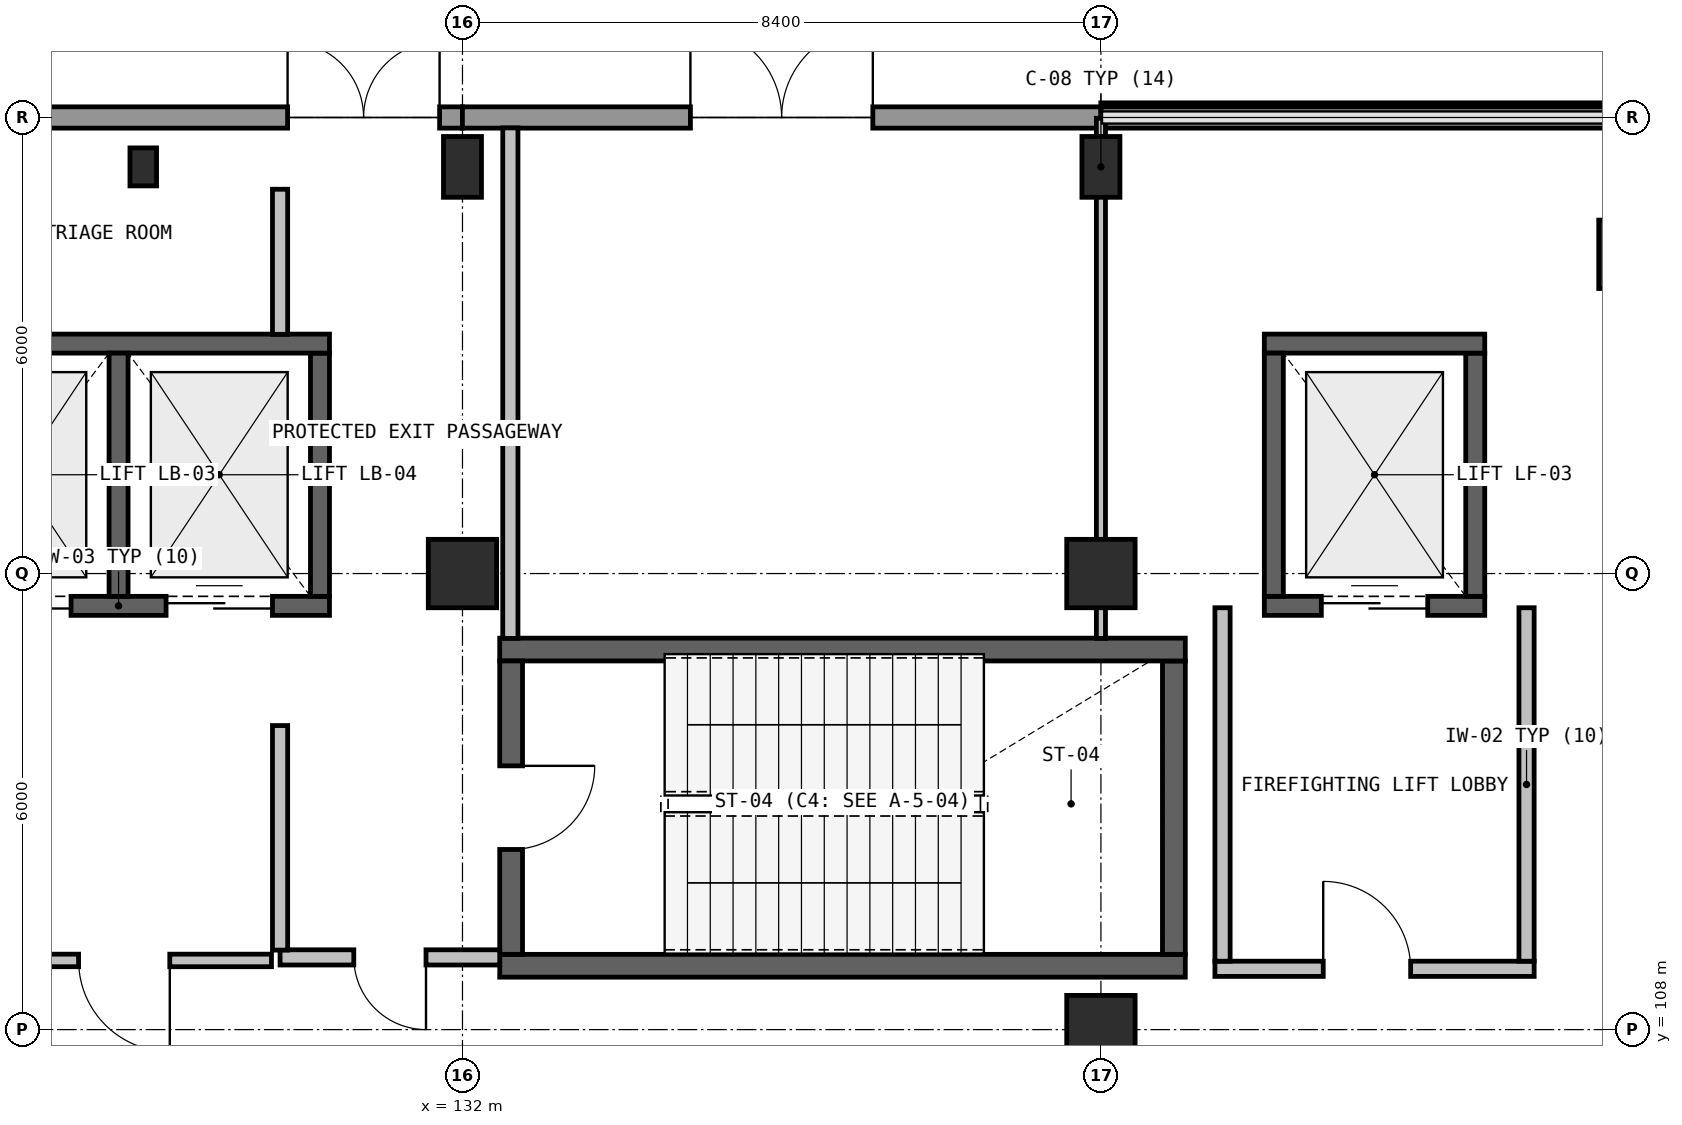
"""IFC4 building model, lengths in metres.
Left out: names, types, materials, properties, quantities, classifications, styles, units other than length and angle.
Written with IfcOpenShell. Run it as: python <this file> out.ifc"""

import sys

from ifc_helpers import new_model, si_unit, direction, frame, frame_2d, origin, origin_2d, place, context, subcontext, project, spatial, rectangle, extrude, element, fill, save


model = new_model("IFC4")
c1 = context("Model", 3, precision=1e-05, world=origin(), true_north=direction((0.0, 1.0)))
c2 = subcontext(c1, "Body", "Model", "MODEL_VIEW")
j1 = project(units=[si_unit("LENGTHUNIT", "METRE"), si_unit("PLANEANGLEUNIT", "RADIAN")], contexts=[c1])
p1 = place(None, origin())
s1 = spatial("IfcSite", under=j1, at=p1, CompositionType="ELEMENT")
p2 = place(p1, origin())
s2 = spatial("IfcBuilding", under=s1, at=p2, CompositionType="ELEMENT")
p3 = place(p2, origin())
s3 = spatial("IfcBuildingStorey", under=s2, at=p3, CompositionType="ELEMENT", Elevation=0.0)
for number, where, z_axis, x_axis in (
    (1, (147.4, 118.2, 0.0), (0.0, 0.0, 1.0), (1.0, 0.0, 0.0)),
    (2, (132.0, 114.0, 0.0), (0.0, 0.0, 1.0), (1.0, 0.0, 0.0)),
):
    element("IfcColumn", number, at=place(p3, frame(where, z_axis=z_axis, x_axis=x_axis)), inside=s3, PredefinedType="COLUMN", context=c2, shape_type="SweptSolid", body=[
        extrude(rectangle(XDim=0.9, YDim=0.9, at=origin_2d()), origin(), (0.0, 0.0, 1.0), 5.4),
    ])
p4 = place(p3, frame((132.0, 119.35, 0.0), z_axis=(0.0, 0.0, 1.0), x_axis=(1.0, 0.0, 0.0)))
e3 = element("IfcColumn", 3, at=p4, inside=s3, PredefinedType="COLUMN", context=c2, shape_type="SweptSolid", body=[
    extrude(rectangle(XDim=0.5, YDim=0.8, at=origin_2d()), origin(), (0.0, 0.0, 1.0), 5.4),
])
for number, where, z_axis, x_axis in (
    (4, (140.4, 108.0, 0.0), (0.0, 0.0, 1.0), (1.0, 0.0, 0.0)),
    (5, (140.4, 114.0, 0.0), (0.0, 0.0, 1.0), (1.0, 0.0, 0.0)),
):
    element("IfcColumn", number, at=place(p3, frame(where, z_axis=z_axis, x_axis=x_axis)), inside=s3, PredefinedType="COLUMN", context=c2, shape_type="SweptSolid", body=[
        extrude(rectangle(XDim=0.9, YDim=0.9, at=origin_2d()), origin(), (0.0, 0.0, 1.0), 5.4),
    ])
p5 = place(p3, frame((140.4, 119.35, 0.0), z_axis=(0.0, 0.0, 1.0), x_axis=(1.0, 0.0, 0.0)))
e6 = element("IfcColumn", 6, at=p5, inside=s3, PredefinedType="COLUMN", context=c2, shape_type="SweptSolid", body=[
    extrude(rectangle(XDim=0.5, YDim=0.8, at=origin_2d()), origin(), (0.0, 0.0, 1.0), 5.4),
])
p6 = place(p3, frame((127.8, 119.35, 0.0), z_axis=(0.0, 0.0, 1.0), x_axis=(1.0, 0.0, 0.0)))
e7 = element("IfcColumn", 7, at=p6, inside=s3, PredefinedType="PILASTER", context=c2, shape_type="SweptSolid", body=[
    extrude(rectangle(XDim=0.35, YDim=0.5, at=origin_2d()), origin(), (0.0, 0.0, 1.0), 5.4),
])
p7 = place(p3, frame((123.599, 120.0, 0.0), z_axis=(0.0, 0.0, 1.0), x_axis=(1.0, 0.0, 0.0)))
e8 = element("IfcWall", 8, at=p7, inside=s3, PredefinedType="SOLIDWALL", context=c2, shape_type="SweptSolid", body=[
    extrude(rectangle(XDim=8.4, YDim=0.28, at=frame_2d((4.2, 0.0))), origin(), (0.0, 0.0, 1.0), 5.08),
])
p8 = place(p7, frame((6.1, 0.0, 0.0)))
e9 = element("IfcOpeningElement", 9, at=p8, cuts=e8, PredefinedType="OPENING", context=c2, shape_type="SweptSolid", body=[
    extrude(rectangle(XDim=2.0, YDim=2.3, at=frame_2d((1.0, 1.15))), frame((0.0, 0.15, 0.0), z_axis=(0.0, -1.0, 0.0), x_axis=(1.0, 0.0, 0.0)), (0.0, 0.0, 1.0), 0.3),
])
p9 = place(p3, frame((131.999, 120.0, 0.0), z_axis=(0.0, 0.0, 1.0), x_axis=(1.0, 0.0, 0.0)))
e10 = element("IfcWall", 10, at=p9, inside=s3, PredefinedType="SOLIDWALL", context=c2, shape_type="SweptSolid", body=[
    extrude(rectangle(XDim=8.4, YDim=0.28, at=frame_2d((4.2, 0.0))), origin(), (0.0, 0.0, 1.0), 5.08),
])
p10 = place(p9, frame((3.0, 0.0, 0.0)))
e11 = element("IfcOpeningElement", 11, at=p10, cuts=e10, PredefinedType="OPENING", context=c2, shape_type="SweptSolid", body=[
    extrude(rectangle(XDim=2.4, YDim=2.35, at=frame_2d((1.2, 1.175))), frame((0.0, 0.15, 0.0), z_axis=(0.0, -1.0, 0.0), x_axis=(1.0, 0.0, 0.0)), (0.0, 0.0, 1.0), 0.3),
])
p11 = place(p3, frame((140.401, 120.0, 0.0), z_axis=(0.0, 0.0, 1.0), x_axis=(1.0, 0.0, 0.0)))
e12 = element("IfcWall", 12, at=p11, inside=s3, PredefinedType="SOLIDWALL", context=c2, shape_type="SweptSolid", body=[
    extrude(rectangle(XDim=8.258, YDim=0.28, at=frame_2d((4.129, 0.0))), origin(), (0.0, 0.0, 1.0), 0.94),
])
p12 = place(p3, frame((132.49, 108.84, 0.0), z_axis=(0.0, 0.0, 1.0), x_axis=(1.0, 0.0, 0.0)))
e13 = element("IfcWall", 13, at=p12, inside=s3, PredefinedType="SHEAR", context=c2, shape_type="SweptSolid", body=[
    extrude(rectangle(XDim=9.02, YDim=0.3, at=frame_2d((4.51, 0.0))), origin(), (0.0, 0.0, 1.0), 5.08),
])
p13 = place(p3, frame((141.36, 108.99, 0.0), z_axis=(0.0, 0.0, 1.0), x_axis=(0.0, 1.0, 0.0)))
e14 = element("IfcWall", 14, at=p13, inside=s3, PredefinedType="SHEAR", context=c2, shape_type="SweptSolid", body=[
    extrude(rectangle(XDim=3.86, YDim=0.3, at=frame_2d((1.93, 0.0))), origin(), (0.0, 0.0, 1.0), 5.08),
])
p14 = place(p3, frame((141.51, 113.0, 0.0), z_axis=(0.0, 0.0, 1.0), x_axis=(-1.0, 0.0, 0.0)))
e15 = element("IfcWall", 15, at=p14, inside=s3, PredefinedType="SHEAR", context=c2, shape_type="SweptSolid", body=[
    extrude(rectangle(XDim=9.02, YDim=0.3, at=frame_2d((4.51, 0.0))), origin(), (0.0, 0.0, 1.0), 5.08),
])
p15 = place(p3, frame((132.64, 112.85, 0.0), z_axis=(0.0, 0.0, 1.0), x_axis=(0.0, -1.0, 0.0)))
e16 = element("IfcWall", 16, at=p15, inside=s3, PredefinedType="SHEAR", context=c2, shape_type="SweptSolid", body=[
    extrude(rectangle(XDim=3.86, YDim=0.3, at=frame_2d((1.93, 0.0))), origin(), (0.0, 0.0, 1.0), 5.08),
])
p16 = place(p15, frame((1.38, 0.0, 0.0)))
e17 = element("IfcOpeningElement", 17, at=p16, cuts=e16, PredefinedType="OPENING", context=c2, shape_type="SweptSolid", body=[
    extrude(rectangle(XDim=1.1, YDim=2.15, at=frame_2d((0.55, 1.075))), frame((0.0, 0.16, 0.0), z_axis=(0.0, -1.0, 0.0), x_axis=(1.0, 0.0, 0.0)), (0.0, 0.0, 1.0), 0.32),
])
p17 = place(p3, frame((141.9, 108.8, 0.0), z_axis=(0.0, 0.0, 1.0), x_axis=(1.0, 0.0, 0.0)))
e18 = element("IfcWall", 18, at=p17, inside=s3, PredefinedType="SOLIDWALL", context=c2, shape_type="SweptSolid", body=[
    extrude(rectangle(XDim=4.2, YDim=0.2, at=frame_2d((2.1, 0.0))), origin(), (0.0, 0.0, 1.0), 5.08),
])
p18 = place(p17, frame((1.425, 0.0, 0.0)))
e19 = element("IfcOpeningElement", 19, at=p18, cuts=e18, PredefinedType="OPENING", context=c2, shape_type="SweptSolid", body=[
    extrude(rectangle(XDim=1.15, YDim=2.15, at=frame_2d((0.575, 1.075))), frame((0.0, 0.11, 0.0), z_axis=(0.0, -1.0, 0.0), x_axis=(1.0, 0.0, 0.0)), (0.0, 0.0, 1.0), 0.22),
])
for number, where, z_axis, x_axis in (
    (20, (146.0, 108.9, 0.0), (0.0, 0.0, 1.0), (0.0, 1.0, 0.0)),
    (21, (142.0, 113.55, 0.0), (0.0, 0.0, 1.0), (0.0, -1.0, 0.0)),
):
    element("IfcWall", number, at=place(p3, frame(where, z_axis=z_axis, x_axis=x_axis)), inside=s3, PredefinedType="SOLIDWALL", context=c2, shape_type="SweptSolid", body=[
        extrude(rectangle(XDim=4.65, YDim=0.2, at=frame_2d((2.325, 0.0))), origin(), (0.0, 0.0, 1.0), 5.08),
    ])
p19 = place(p3, frame((124.7, 113.575, 0.0), z_axis=(0.0, 0.0, 1.0), x_axis=(1.0, 0.0, 0.0)))
e22 = element("IfcWall", 22, at=p19, inside=s3, PredefinedType="SHEAR", context=c2, shape_type="SweptSolid", body=[
    extrude(rectangle(XDim=5.55, YDim=0.25, at=frame_2d((2.775, 0.0))), origin(), (0.0, 0.0, 1.0), 5.08),
])
p20 = place(p19, frame((0.75, 0.0, 0.0)))
e23 = element("IfcOpeningElement", 23, at=p20, cuts=e22, PredefinedType="OPENING", context=c2, shape_type="SweptSolid", body=[
    extrude(rectangle(XDim=1.4, YDim=2.2, at=frame_2d((0.7, 1.1))), frame((0.0, 0.135, 0.0), z_axis=(0.0, -1.0, 0.0), x_axis=(1.0, 0.0, 0.0)), (0.0, 0.0, 1.0), 0.27),
])
p21 = place(p19, frame((3.4, 0.0, 0.0)))
e24 = element("IfcOpeningElement", 24, at=p21, cuts=e22, PredefinedType="OPENING", context=c2, shape_type="SweptSolid", body=[
    extrude(rectangle(XDim=1.4, YDim=2.2, at=frame_2d((0.7, 1.1))), frame((0.0, 0.135, 0.0), z_axis=(0.0, -1.0, 0.0), x_axis=(1.0, 0.0, 0.0)), (0.0, 0.0, 1.0), 0.27),
])
p22 = place(p3, frame((130.125, 113.7, 0.0), z_axis=(0.0, 0.0, 1.0), x_axis=(0.0, 1.0, 0.0)))
e25 = element("IfcWall", 25, at=p22, inside=s3, PredefinedType="SHEAR", context=c2, shape_type="SweptSolid", body=[
    extrude(rectangle(XDim=3.2, YDim=0.25, at=frame_2d((1.6, 0.0))), origin(), (0.0, 0.0, 1.0), 5.08),
])
p23 = place(p3, frame((130.25, 117.025, 0.0), z_axis=(0.0, 0.0, 1.0), x_axis=(-1.0, 0.0, 0.0)))
e26 = element("IfcWall", 26, at=p23, inside=s3, PredefinedType="SHEAR", context=c2, shape_type="SweptSolid", body=[
    extrude(rectangle(XDim=5.55, YDim=0.25, at=frame_2d((2.775, 0.0))), origin(), (0.0, 0.0, 1.0), 5.08),
])
p24 = place(p3, frame((127.475, 113.7, 0.0), z_axis=(0.0, 0.0, 1.0), x_axis=(0.0, 1.0, 0.0)))
e27 = element("IfcWall", 27, at=p24, inside=s3, PredefinedType="SHEAR", context=c2, shape_type="SweptSolid", body=[
    extrude(rectangle(XDim=3.2, YDim=0.25, at=frame_2d((1.6, 0.0))), origin(), (0.0, 0.0, 1.0), 5.08),
])
p25 = place(p3, frame((142.55, 113.575, 0.0), z_axis=(0.0, 0.0, 1.0), x_axis=(1.0, 0.0, 0.0)))
e28 = element("IfcWall", 28, at=p25, inside=s3, PredefinedType="SHEAR", context=c2, shape_type="SweptSolid", body=[
    extrude(rectangle(XDim=2.9, YDim=0.25, at=frame_2d((1.45, 0.0))), origin(), (0.0, 0.0, 1.0), 5.08),
])
p26 = place(p25, frame((0.75, 0.0, 0.0)))
e29 = element("IfcOpeningElement", 29, at=p26, cuts=e28, PredefinedType="OPENING", context=c2, shape_type="SweptSolid", body=[
    extrude(rectangle(XDim=1.4, YDim=2.15, at=frame_2d((0.7, 1.075))), frame((0.0, 0.135, 0.0), z_axis=(0.0, -1.0, 0.0), x_axis=(1.0, 0.0, 0.0)), (0.0, 0.0, 1.0), 0.27),
])
p27 = place(p3, frame((145.325, 113.7, 0.0), z_axis=(0.0, 0.0, 1.0), x_axis=(0.0, 1.0, 0.0)))
e30 = element("IfcWall", 30, at=p27, inside=s3, PredefinedType="SHEAR", context=c2, shape_type="SweptSolid", body=[
    extrude(rectangle(XDim=3.2, YDim=0.25, at=frame_2d((1.6, 0.0))), origin(), (0.0, 0.0, 1.0), 5.08),
])
p28 = place(p3, frame((145.45, 117.025, 0.0), z_axis=(0.0, 0.0, 1.0), x_axis=(-1.0, 0.0, 0.0)))
e31 = element("IfcWall", 31, at=p28, inside=s3, PredefinedType="SHEAR", context=c2, shape_type="SweptSolid", body=[
    extrude(rectangle(XDim=2.9, YDim=0.25, at=frame_2d((1.45, 0.0))), origin(), (0.0, 0.0, 1.0), 5.08),
])
p29 = place(p3, frame((142.675, 116.9, 0.0), z_axis=(0.0, 0.0, 1.0), x_axis=(0.0, -1.0, 0.0)))
e32 = element("IfcWall", 32, at=p29, inside=s3, PredefinedType="SHEAR", context=c2, shape_type="SweptSolid", body=[
    extrude(rectangle(XDim=3.2, YDim=0.25, at=frame_2d((1.6, 0.0))), origin(), (0.0, 0.0, 1.0), 5.08),
])
p30 = place(p3, frame((129.6, 117.147, 0.0), z_axis=(0.0, 0.0, 1.0), x_axis=(0.0, 1.0, 0.0)))
e33 = element("IfcWall", 33, at=p30, inside=s3, PredefinedType="SOLIDWALL", context=c2, shape_type="SweptSolid", body=[
    extrude(rectangle(XDim=1.909, YDim=0.2, at=frame_2d((0.955, 0.0))), origin(), (0.0, 0.0, 1.0), 5.08),
])
p31 = place(p3, frame((132.63, 119.863, 0.0), z_axis=(0.0, 0.0, 1.0), x_axis=(0.0, -1.0, 0.0)))
e34 = element("IfcWall", 34, at=p31, inside=s3, PredefinedType="SOLIDWALL", context=c2, shape_type="SweptSolid", body=[
    extrude(rectangle(XDim=6.716, YDim=0.2, at=frame_2d((3.358, 0.0))), origin(), (0.0, 0.0, 1.0), 5.08),
])
p32 = place(p3, frame((132.49, 108.95, 0.0), z_axis=(0.0, 0.0, 1.0), x_axis=(-1.0, 0.0, 0.0)))
e35 = element("IfcWall", 35, at=p32, inside=s3, PredefinedType="SOLIDWALL", context=c2, shape_type="SweptSolid", body=[
    extrude(rectangle(XDim=2.89, YDim=0.2, at=frame_2d((1.445, 0.0))), origin(), (0.0, 0.0, 1.0), 5.08),
])
p33 = place(p32, frame((0.97, 0.0, 0.0)))
e36 = element("IfcOpeningElement", 36, at=p33, cuts=e35, PredefinedType="OPENING", context=c2, shape_type="SweptSolid", body=[
    extrude(rectangle(XDim=0.95, YDim=2.1, at=frame_2d((0.475, 1.05))), frame((0.0, 0.11, 0.0), z_axis=(0.0, -1.0, 0.0), x_axis=(1.0, 0.0, 0.0)), (0.0, 0.0, 1.0), 0.22),
])
p34 = place(p3, frame((129.6, 109.046, 0.0), z_axis=(0.0, 0.0, 1.0), x_axis=(0.0, 1.0, 0.0)))
e37 = element("IfcWall", 37, at=p34, inside=s3, PredefinedType="SOLIDWALL", context=c2, shape_type="SweptSolid", body=[
    extrude(rectangle(XDim=2.954, YDim=0.2, at=frame_2d((1.477, 0.0))), origin(), (0.0, 0.0, 1.0), 5.08),
])
p35 = place(p3, frame((129.487, 108.91, 0.0), z_axis=(0.0, 0.0, 1.0), x_axis=(-1.0, 0.0, 0.0)))
e38 = element("IfcWall", 38, at=p35, inside=s3, PredefinedType="PARTITIONING", context=c2, shape_type="SweptSolid", body=[
    extrude(rectangle(XDim=3.876, YDim=0.165, at=frame_2d((1.938, 0.0))), origin(), (0.0, 0.0, 1.0), 5.08),
])
p36 = place(p35, frame((1.338, 0.0, 0.0)))
e39 = element("IfcOpeningElement", 39, at=p36, cuts=e38, PredefinedType="OPENING", context=c2, shape_type="SweptSolid", body=[
    extrude(rectangle(XDim=1.2, YDim=2.15, at=frame_2d((0.6, 1.075))), frame((0.0, 0.093, 0.0), z_axis=(0.0, -1.0, 0.0), x_axis=(1.0, 0.0, 0.0)), (0.0, 0.0, 1.0), 0.185),
])
p37 = place(p3, frame((140.4, 113.147, 0.0), z_axis=(0.0, 0.0, 1.0), x_axis=(0.0, 1.0, 0.0)))
e40 = element("IfcWall", 40, at=p37, inside=s3, PredefinedType="PARTITIONING", context=c2, shape_type="SweptSolid", body=[
    extrude(rectangle(XDim=6.843, YDim=0.12, at=frame_2d((3.421, 0.0))), origin(), (0.0, 0.0, 1.0), 4.33),
])
p38 = place(p8, origin())
e41 = element("IfcDoor", 41, at=p38, inside=s3, OperationType="DOUBLE_DOOR_SINGLE_SWING", PredefinedType="DOOR", context=c2, shape_type="SweptSolid", body=[
    extrude(rectangle(XDim=2.0, YDim=2.3, at=frame_2d((1.0, 1.15))), frame((0.0, 0.025, 0.0), z_axis=(0.0, -1.0, 0.0), x_axis=(1.0, 0.0, 0.0)), (0.0, 0.0, 1.0), 0.05),
])
fill(e9, e41)
p39 = place(p10, origin())
e42 = element("IfcDoor", 42, at=p39, inside=s3, OperationType="DOUBLE_DOOR_SINGLE_SWING", PredefinedType="DOOR", context=c2, shape_type="SweptSolid", body=[
    extrude(rectangle(XDim=2.4, YDim=2.35, at=frame_2d((1.2, 1.175))), frame((0.0, 0.025, 0.0), z_axis=(0.0, -1.0, 0.0), x_axis=(1.0, 0.0, 0.0)), (0.0, 0.0, 1.0), 0.05),
])
fill(e11, e42)
p40 = place(p16, origin())
e43 = element("IfcDoor", 43, at=p40, inside=s3, OperationType="SINGLE_SWING_LEFT", PredefinedType="DOOR", context=c2, shape_type="SweptSolid", body=[
    extrude(rectangle(XDim=1.1, YDim=2.15, at=frame_2d((0.55, 1.075))), frame((0.0, 0.025, 0.0), z_axis=(0.0, -1.0, 0.0), x_axis=(1.0, 0.0, 0.0)), (0.0, 0.0, 1.0), 0.05),
])
fill(e17, e43)
p41 = place(p18, origin())
e44 = element("IfcDoor", 44, at=p41, inside=s3, OperationType="SINGLE_SWING_RIGHT", PredefinedType="DOOR", context=c2, shape_type="SweptSolid", body=[
    extrude(rectangle(XDim=1.15, YDim=2.15, at=frame_2d((0.575, 1.075))), frame((0.0, 0.025, 0.0), z_axis=(0.0, -1.0, 0.0), x_axis=(1.0, 0.0, 0.0)), (0.0, 0.0, 1.0), 0.05),
])
fill(e19, e44)
p42 = place(p20, origin())
e45 = element("IfcDoor", 45, at=p42, inside=s3, OperationType="DOUBLE_DOOR_SLIDING", PredefinedType="DOOR", context=c2, shape_type="SweptSolid", body=[
    extrude(rectangle(XDim=1.4, YDim=2.2, at=frame_2d((0.7, 1.1))), frame((0.0, 0.025, 0.0), z_axis=(0.0, -1.0, 0.0), x_axis=(1.0, 0.0, 0.0)), (0.0, 0.0, 1.0), 0.05),
])
fill(e23, e45)
p43 = place(p21, origin())
e46 = element("IfcDoor", 46, at=p43, inside=s3, OperationType="DOUBLE_DOOR_SLIDING", PredefinedType="DOOR", context=c2, shape_type="SweptSolid", body=[
    extrude(rectangle(XDim=1.4, YDim=2.2, at=frame_2d((0.7, 1.1))), frame((0.0, 0.025, 0.0), z_axis=(0.0, -1.0, 0.0), x_axis=(1.0, 0.0, 0.0)), (0.0, 0.0, 1.0), 0.05),
])
fill(e24, e46)
p44 = place(p26, origin())
e47 = element("IfcDoor", 47, at=p44, inside=s3, OperationType="DOUBLE_DOOR_SLIDING", PredefinedType="DOOR", context=c2, shape_type="SweptSolid", body=[
    extrude(rectangle(XDim=1.4, YDim=2.15, at=frame_2d((0.7, 1.075))), frame((0.0, 0.025, 0.0), z_axis=(0.0, -1.0, 0.0), x_axis=(1.0, 0.0, 0.0)), (0.0, 0.0, 1.0), 0.05),
])
fill(e29, e47)
p45 = place(p33, origin())
e48 = element("IfcDoor", 48, at=p45, inside=s3, OperationType="SINGLE_SWING_RIGHT", PredefinedType="DOOR", context=c2, shape_type="SweptSolid", body=[
    extrude(rectangle(XDim=0.95, YDim=2.1, at=frame_2d((0.475, 1.05))), frame((0.0, 0.025, 0.0), z_axis=(0.0, -1.0, 0.0), x_axis=(1.0, 0.0, 0.0)), (0.0, 0.0, 1.0), 0.05),
])
fill(e36, e48)
p46 = place(p36, origin())
e49 = element("IfcDoor", 49, at=p46, inside=s3, OperationType="SINGLE_SWING_LEFT", PredefinedType="DOOR", context=c2, shape_type="SweptSolid", body=[
    extrude(rectangle(XDim=1.2, YDim=2.15, at=frame_2d((0.6, 1.075))), frame((0.0, 0.025, 0.0), z_axis=(0.0, -1.0, 0.0), x_axis=(1.0, 0.0, 0.0)), (0.0, 0.0, 1.0), 0.05),
])
fill(e39, e49)
save(model, sys.argv[1])
